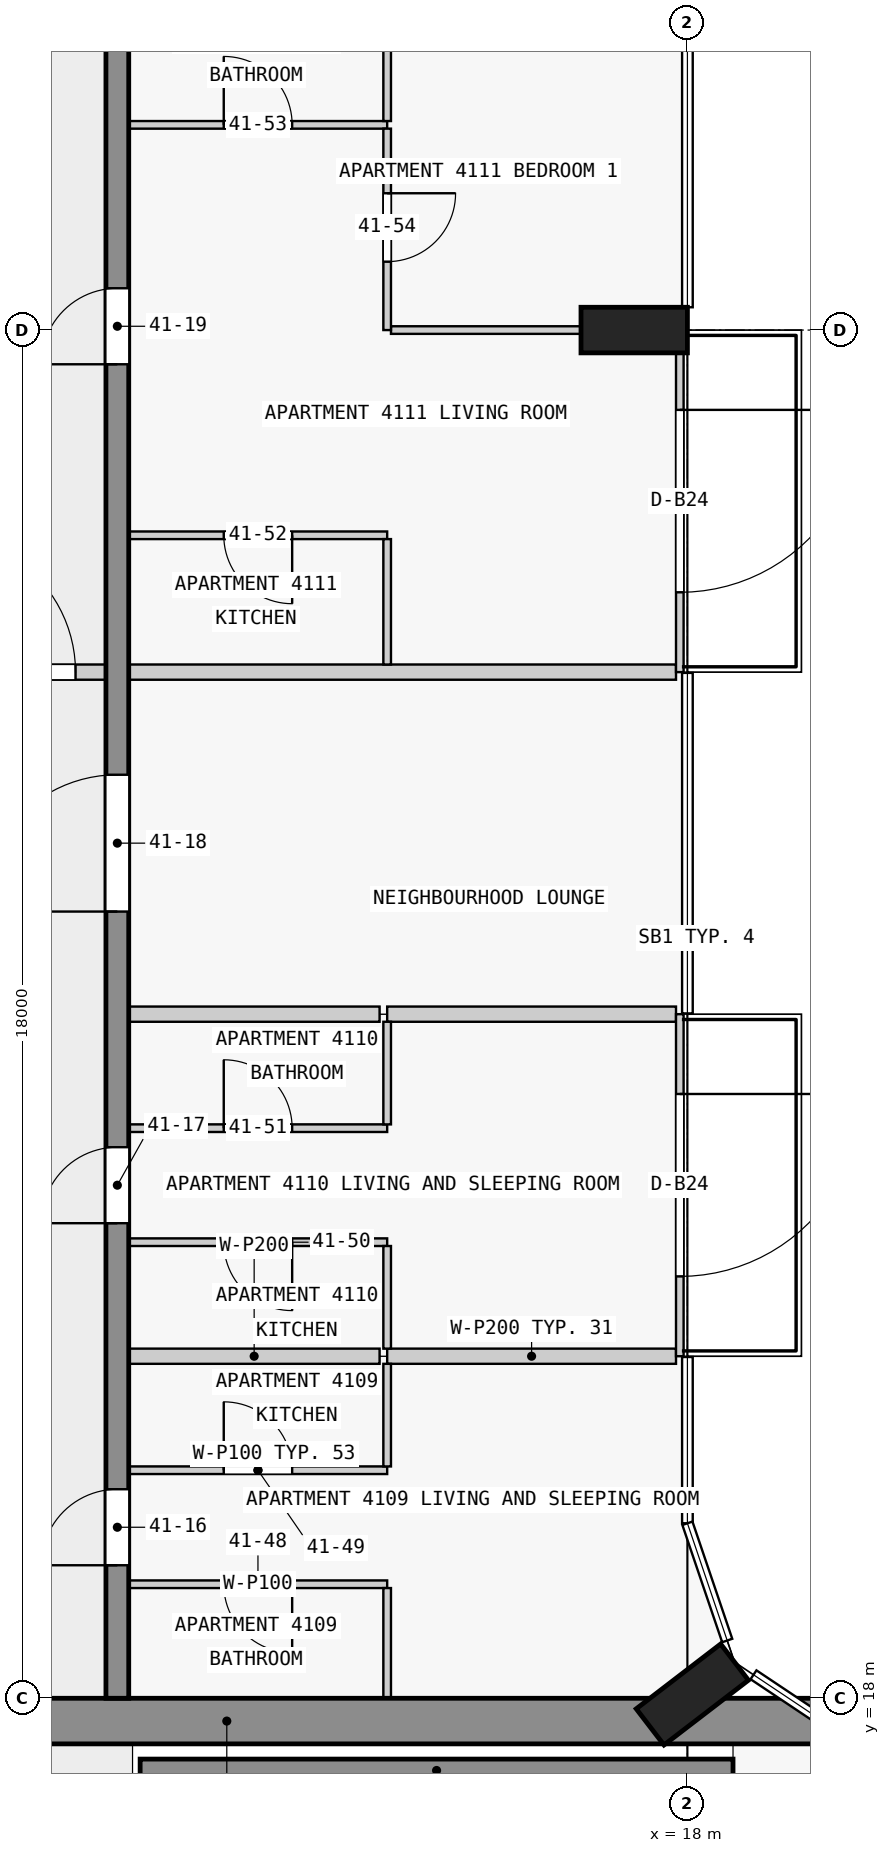
"""IFC4 building model, lengths in metres.
Left out: names, types, materials, properties, quantities, classifications, styles, units other than length and angle.
Written with IfcOpenShell. Run it as: python <this file> out.ifc"""

import sys

from ifc_helpers import new_model, si_unit, direction, frame, frame_2d, origin, origin_2d, place, context, subcontext, project, spatial, rectangle, extrude, element, fill, save


model = new_model("IFC4")
c1 = context("Model", 3, precision=1e-05, world=origin(), true_north=direction((0.0, 1.0)))
c2 = subcontext(c1, "Body", "Model", "MODEL_VIEW")
j1 = project(units=[si_unit("LENGTHUNIT", "METRE"), si_unit("PLANEANGLEUNIT", "RADIAN")], contexts=[c1])
p1 = place(None, origin())
s1 = spatial("IfcSite", under=j1, at=p1, CompositionType="ELEMENT")
p2 = place(p1, origin())
s2 = spatial("IfcBuilding", under=s1, at=p2, CompositionType="ELEMENT")
p3 = place(p2, frame((0.0, 0.0, 160.4)))
s3 = spatial("IfcBuildingStorey", under=s2, at=p3, CompositionType="ELEMENT", Elevation=160.4)
for number, where, z_axis, x_axis in (
    (1, (18.065, 18.05, 0.0), (0.0, 0.0, 1.0), (-0.609, 0.793, 0.0)),
    (2, (17.3, 36.0, 0.0), (0.0, 0.0, 1.0), (0.0, 1.0, 0.0)),
):
    element("IfcColumn", number, at=place(p3, frame(where, z_axis=z_axis, x_axis=x_axis)), inside=s3, PredefinedType="COLUMN", context=c2, shape_type="SweptSolid", body=[
        extrude(rectangle(XDim=0.6, YDim=1.4, at=origin_2d()), origin(), (0.0, 0.0, 1.0), 3.5),
    ])
p4 = place(p3, frame((1.38, 17.7, 0.0), z_axis=(0.0, 0.0, 1.0), x_axis=(1.0, 0.0, 0.0)))
e3 = element("IfcWall", 3, at=p4, inside=s3, PredefinedType="SHEAR", context=c2, shape_type="SweptSolid", body=[
    extrude(rectangle(XDim=21.12, YDim=0.6, at=frame_2d((10.56, 0.0))), origin(), (0.0, 0.0, 1.0), 3.25),
])
p5 = place(p4, frame((6.4, 0.0, 0.0)))
e4 = element("IfcOpeningElement", 4, at=p5, cuts=e3, PredefinedType="OPENING", context=c2, shape_type="SweptSolid", body=[
    extrude(rectangle(XDim=1.8, YDim=2.1, at=frame_2d((0.9, 1.05))), frame((0.0, 0.31, 0.0), z_axis=(0.0, -1.0, 0.0), x_axis=(1.0, 0.0, 0.0)), (0.0, 0.0, 1.0), 0.62),
])
p6 = place(p3, frame((10.8, 17.05, 0.0), z_axis=(0.0, 0.0, 1.0), x_axis=(1.0, 0.0, 0.0)))
e5 = element("IfcWall", 5, at=p6, inside=s3, PredefinedType="SHEAR", context=c2, shape_type="SweptSolid", body=[
    extrude(rectangle(XDim=7.8, YDim=0.3, at=frame_2d((3.9, 0.0))), origin(), (0.0, 0.0, 1.0), 3.25),
])
p7 = place(p3, frame((10.5, 18.0, 0.0), z_axis=(0.0, 0.0, 1.0), x_axis=(0.0, 1.0, 0.0)))
e6 = element("IfcWall", 6, at=p7, inside=s3, PredefinedType="SHEAR", context=c2, shape_type="SweptSolid", body=[
    extrude(rectangle(XDim=27.0, YDim=0.3, at=frame_2d((13.5, 0.0))), origin(), (0.0, 0.0, 1.0), 3.25),
])
p8 = place(p7, frame((1.75, 0.0, 0.0)))
e7 = element("IfcOpeningElement", 7, at=p8, cuts=e6, PredefinedType="OPENING", context=c2, shape_type="SweptSolid", body=[
    extrude(rectangle(XDim=1.0, YDim=2.1, at=frame_2d((0.5, 1.05))), frame((0.0, 0.16, 0.0), z_axis=(0.0, -1.0, 0.0), x_axis=(1.0, 0.0, 0.0)), (0.0, 0.0, 1.0), 0.32),
])
p9 = place(p7, frame((6.25, 0.0, 0.0)))
e8 = element("IfcOpeningElement", 8, at=p9, cuts=e6, PredefinedType="OPENING", context=c2, shape_type="SweptSolid", body=[
    extrude(rectangle(XDim=1.0, YDim=2.1, at=frame_2d((0.5, 1.05))), frame((0.0, 0.16, 0.0), z_axis=(0.0, -1.0, 0.0), x_axis=(1.0, 0.0, 0.0)), (0.0, 0.0, 1.0), 0.32),
])
p10 = place(p7, frame((10.35, 0.0, 0.0)))
e9 = element("IfcOpeningElement", 9, at=p10, cuts=e6, PredefinedType="OPENING", context=c2, shape_type="SweptSolid", body=[
    extrude(rectangle(XDim=1.8, YDim=2.1, at=frame_2d((0.9, 1.05))), frame((0.0, 0.16, 0.0), z_axis=(0.0, -1.0, 0.0), x_axis=(1.0, 0.0, 0.0)), (0.0, 0.0, 1.0), 0.32),
])
p11 = place(p7, frame((17.55, 0.0, 0.0)))
e10 = element("IfcOpeningElement", 10, at=p11, cuts=e6, PredefinedType="OPENING", context=c2, shape_type="SweptSolid", body=[
    extrude(rectangle(XDim=1.0, YDim=2.1, at=frame_2d((0.5, 1.05))), frame((0.0, 0.16, 0.0), z_axis=(0.0, -1.0, 0.0), x_axis=(1.0, 0.0, 0.0)), (0.0, 0.0, 1.0), 0.32),
])
p12 = place(p7, frame((23.25, 0.0, 0.0)))
e11 = element("IfcOpeningElement", 11, at=p12, cuts=e6, PredefinedType="OPENING", context=c2, shape_type="SweptSolid", body=[
    extrude(rectangle(XDim=0.9, YDim=2.1, at=frame_2d((0.45, 1.05))), frame((0.0, 0.16, 0.0), z_axis=(0.0, -1.0, 0.0), x_axis=(1.0, 0.0, 0.0)), (0.0, 0.0, 1.0), 0.32),
])
p13 = place(p7, frame((25.45, 0.0, 0.0)))
e12 = element("IfcOpeningElement", 12, at=p13, cuts=e6, PredefinedType="OPENING", context=c2, shape_type="SweptSolid", body=[
    extrude(rectangle(XDim=1.0, YDim=2.1, at=frame_2d((0.5, 1.05))), frame((0.0, 0.16, 0.0), z_axis=(0.0, -1.0, 0.0), x_axis=(1.0, 0.0, 0.0)), (0.0, 0.0, 1.0), 0.32),
])
p14 = place(p3, frame((17.9, 27.0, 0.0), z_axis=(0.0, 0.0, 1.0), x_axis=(0.0, -1.0, 0.0)))
e13 = element("IfcWall", 13, at=p14, inside=s3, PredefinedType="STANDARD", context=c2, shape_type="SweptSolid", body=[
    extrude(rectangle(XDim=4.5, YDim=0.1, at=frame_2d((2.25, 0.0))), origin(), (0.0, 0.0, 1.0), 3.25),
])
p15 = place(p14, frame((1.05, 0.0, 0.0)))
e14 = element("IfcOpeningElement", 14, at=p15, cuts=e13, PredefinedType="OPENING", context=c2, shape_type="SweptSolid", body=[
    extrude(rectangle(XDim=2.4, YDim=2.4, at=frame_2d((1.2, 1.2))), frame((0.0, 0.06, 0.0), z_axis=(0.0, -1.0, 0.0), x_axis=(1.0, 0.0, 0.0)), (0.0, 0.0, 1.0), 0.12),
])
p16 = place(p3, frame((17.9, 36.0, 0.0), z_axis=(0.0, 0.0, 1.0), x_axis=(0.0, -1.0, 0.0)))
e15 = element("IfcWall", 15, at=p16, inside=s3, PredefinedType="STANDARD", context=c2, shape_type="SweptSolid", body=[
    extrude(rectangle(XDim=4.5, YDim=0.1, at=frame_2d((2.25, 0.0))), origin(), (0.0, 0.0, 1.0), 3.25),
])
p17 = place(p16, frame((1.05, 0.0, 0.0)))
e16 = element("IfcOpeningElement", 16, at=p17, cuts=e15, PredefinedType="OPENING", context=c2, shape_type="SweptSolid", body=[
    extrude(rectangle(XDim=2.4, YDim=2.4, at=frame_2d((1.2, 1.2))), frame((0.0, 0.06, 0.0), z_axis=(0.0, -1.0, 0.0), x_axis=(1.0, 0.0, 0.0)), (0.0, 0.0, 1.0), 0.12),
])
p18 = place(p3, frame((14.05, 19.5, 0.0), z_axis=(0.0, 0.0, 1.0), x_axis=(-1.0, 0.0, 0.0)))
e17 = element("IfcWall", 17, at=p18, inside=s3, PredefinedType="PARTITIONING", context=c2, shape_type="SweptSolid", body=[
    extrude(rectangle(XDim=3.4, YDim=0.1, at=frame_2d((1.7, 0.0))), origin(), (0.0, 0.0, 1.0), 3.25),
])
p19 = place(p18, frame((1.25, 0.0, 0.0)))
e18 = element("IfcOpeningElement", 18, at=p19, cuts=e17, PredefinedType="OPENING", context=c2, shape_type="SweptSolid", body=[
    extrude(rectangle(XDim=0.9, YDim=2.1, at=frame_2d((0.45, 1.05))), frame((0.0, 0.06, 0.0), z_axis=(0.0, -1.0, 0.0), x_axis=(1.0, 0.0, 0.0)), (0.0, 0.0, 1.0), 0.12),
])
p20 = place(p3, frame((10.65, 21.0, 0.0), z_axis=(0.0, 0.0, 1.0), x_axis=(1.0, 0.0, 0.0)))
e19 = element("IfcWall", 19, at=p20, inside=s3, PredefinedType="PARTITIONING", context=c2, shape_type="SweptSolid", body=[
    extrude(rectangle(XDim=3.4, YDim=0.1, at=frame_2d((1.7, 0.0))), origin(), (0.0, 0.0, 1.0), 3.25),
])
p21 = place(p20, frame((1.25, 0.0, 0.0)))
e20 = element("IfcOpeningElement", 20, at=p21, cuts=e19, PredefinedType="OPENING", context=c2, shape_type="SweptSolid", body=[
    extrude(rectangle(XDim=0.9, YDim=2.1, at=frame_2d((0.45, 1.05))), frame((0.0, 0.06, 0.0), z_axis=(0.0, -1.0, 0.0), x_axis=(1.0, 0.0, 0.0)), (0.0, 0.0, 1.0), 0.12),
])
p22 = place(p3, frame((13.95, 22.5, 0.0), z_axis=(0.0, 0.0, 1.0), x_axis=(-1.0, 0.0, 0.0)))
e21 = element("IfcWall", 21, at=p22, inside=s3, PredefinedType="PARTITIONING", context=c2, shape_type="SweptSolid", body=[
    extrude(rectangle(XDim=3.3, YDim=0.2, at=frame_2d((1.65, 0.0))), origin(), (0.0, 0.0, 1.0), 3.25),
])
p23 = place(p3, frame((14.05, 22.5, 0.0), z_axis=(0.0, 0.0, 1.0), x_axis=(1.0, 0.0, 0.0)))
e22 = element("IfcWall", 22, at=p23, inside=s3, PredefinedType="PARTITIONING", context=c2, shape_type="SweptSolid", body=[
    extrude(rectangle(XDim=3.8, YDim=0.2, at=frame_2d((1.9, 0.0))), origin(), (0.0, 0.0, 1.0), 3.25),
])
p24 = place(p3, frame((14.05, 24.0, 0.0), z_axis=(0.0, 0.0, 1.0), x_axis=(-1.0, 0.0, 0.0)))
e23 = element("IfcWall", 23, at=p24, inside=s3, PredefinedType="PARTITIONING", context=c2, shape_type="SweptSolid", body=[
    extrude(rectangle(XDim=3.4, YDim=0.1, at=frame_2d((1.7, 0.0))), origin(), (0.0, 0.0, 1.0), 3.25),
])
p25 = place(p24, frame((1.25, 0.0, 0.0)))
e24 = element("IfcOpeningElement", 24, at=p25, cuts=e23, PredefinedType="OPENING", context=c2, shape_type="SweptSolid", body=[
    extrude(rectangle(XDim=0.9, YDim=2.1, at=frame_2d((0.45, 1.05))), frame((0.0, 0.06, 0.0), z_axis=(0.0, -1.0, 0.0), x_axis=(1.0, 0.0, 0.0)), (0.0, 0.0, 1.0), 0.12),
])
p26 = place(p3, frame((10.65, 25.5, 0.0), z_axis=(0.0, 0.0, 1.0), x_axis=(1.0, 0.0, 0.0)))
e25 = element("IfcWall", 25, at=p26, inside=s3, PredefinedType="PARTITIONING", context=c2, shape_type="SweptSolid", body=[
    extrude(rectangle(XDim=3.4, YDim=0.1, at=frame_2d((1.7, 0.0))), origin(), (0.0, 0.0, 1.0), 3.25),
])
p27 = place(p26, frame((1.25, 0.0, 0.0)))
e26 = element("IfcOpeningElement", 26, at=p27, cuts=e25, PredefinedType="OPENING", context=c2, shape_type="SweptSolid", body=[
    extrude(rectangle(XDim=0.9, YDim=2.1, at=frame_2d((0.45, 1.05))), frame((0.0, 0.06, 0.0), z_axis=(0.0, -1.0, 0.0), x_axis=(1.0, 0.0, 0.0)), (0.0, 0.0, 1.0), 0.12),
])
p28 = place(p3, frame((13.95, 27.0, 0.0), z_axis=(0.0, 0.0, 1.0), x_axis=(-1.0, 0.0, 0.0)))
e27 = element("IfcWall", 27, at=p28, inside=s3, PredefinedType="PARTITIONING", context=c2, shape_type="SweptSolid", body=[
    extrude(rectangle(XDim=3.3, YDim=0.2, at=frame_2d((1.65, 0.0))), origin(), (0.0, 0.0, 1.0), 3.25),
])
p29 = place(p3, frame((14.05, 27.0, 0.0), z_axis=(0.0, 0.0, 1.0), x_axis=(1.0, 0.0, 0.0)))
e28 = element("IfcWall", 28, at=p29, inside=s3, PredefinedType="PARTITIONING", context=c2, shape_type="SweptSolid", body=[
    extrude(rectangle(XDim=3.8, YDim=0.2, at=frame_2d((1.9, 0.0))), origin(), (0.0, 0.0, 1.0), 3.25),
])
p30 = place(p3, frame((17.85, 31.5, 0.0), z_axis=(0.0, 0.0, 1.0), x_axis=(-1.0, 0.0, 0.0)))
e29 = element("IfcWall", 29, at=p30, inside=s3, PredefinedType="PARTITIONING", context=c2, shape_type="SweptSolid", body=[
    extrude(rectangle(XDim=7.2, YDim=0.2, at=frame_2d((3.6, 0.0))), origin(), (0.0, 0.0, 1.0), 3.25),
])
p31 = place(p3, frame((14.05, 33.3, 0.0), z_axis=(0.0, 0.0, 1.0), x_axis=(-1.0, 0.0, 0.0)))
e30 = element("IfcWall", 30, at=p31, inside=s3, PredefinedType="PARTITIONING", context=c2, shape_type="SweptSolid", body=[
    extrude(rectangle(XDim=3.4, YDim=0.1, at=frame_2d((1.7, 0.0))), origin(), (0.0, 0.0, 1.0), 3.25),
])
p32 = place(p31, frame((1.25, 0.0, 0.0)))
e31 = element("IfcOpeningElement", 31, at=p32, cuts=e30, PredefinedType="OPENING", context=c2, shape_type="SweptSolid", body=[
    extrude(rectangle(XDim=0.9, YDim=2.1, at=frame_2d((0.45, 1.05))), frame((0.0, 0.06, 0.0), z_axis=(0.0, -1.0, 0.0), x_axis=(1.0, 0.0, 0.0)), (0.0, 0.0, 1.0), 0.12),
])
p33 = place(p3, frame((14.1, 36.0, 0.0), z_axis=(0.0, 0.0, 1.0), x_axis=(1.0, 0.0, 0.0)))
e32 = element("IfcWall", 32, at=p33, inside=s3, PredefinedType="PARTITIONING", context=c2, shape_type="SweptSolid", body=[
    extrude(rectangle(XDim=2.5, YDim=0.1, at=frame_2d((1.25, 0.0))), origin(), (0.0, 0.0, 1.0), 3.25),
])
p34 = place(p3, frame((10.65, 38.7, 0.0), z_axis=(0.0, 0.0, 1.0), x_axis=(1.0, 0.0, 0.0)))
e33 = element("IfcWall", 33, at=p34, inside=s3, PredefinedType="PARTITIONING", context=c2, shape_type="SweptSolid", body=[
    extrude(rectangle(XDim=3.4, YDim=0.1, at=frame_2d((1.7, 0.0))), origin(), (0.0, 0.0, 1.0), 3.25),
])
p35 = place(p34, frame((1.25, 0.0, 0.0)))
e34 = element("IfcOpeningElement", 34, at=p35, cuts=e33, PredefinedType="OPENING", context=c2, shape_type="SweptSolid", body=[
    extrude(rectangle(XDim=0.9, YDim=2.1, at=frame_2d((0.45, 1.05))), frame((0.0, 0.06, 0.0), z_axis=(0.0, -1.0, 0.0), x_axis=(1.0, 0.0, 0.0)), (0.0, 0.0, 1.0), 0.12),
])
p36 = place(p3, frame((14.05, 38.65, 0.0), z_axis=(0.0, 0.0, 1.0), x_axis=(0.0, -1.0, 0.0)))
e35 = element("IfcWall", 35, at=p36, inside=s3, PredefinedType="PARTITIONING", context=c2, shape_type="SweptSolid", body=[
    extrude(rectangle(XDim=2.65, YDim=0.1, at=frame_2d((1.325, 0.0))), origin(), (0.0, 0.0, 1.0), 3.25),
])
p37 = place(p36, frame((0.85, 0.0, 0.0)))
e36 = element("IfcOpeningElement", 36, at=p37, cuts=e35, PredefinedType="OPENING", context=c2, shape_type="SweptSolid", body=[
    extrude(rectangle(XDim=0.9, YDim=2.1, at=frame_2d((0.45, 1.05))), frame((0.0, 0.06, 0.0), z_axis=(0.0, -1.0, 0.0), x_axis=(1.0, 0.0, 0.0)), (0.0, 0.0, 1.0), 0.12),
])
p38 = place(p3, frame((14.05, 18.0, 0.0), z_axis=(0.0, 0.0, 1.0), x_axis=(0.0, 1.0, 0.0)))
e37 = element("IfcWall", 37, at=p38, inside=s3, PredefinedType="PARTITIONING", context=c2, shape_type="SweptSolid", body=[
    extrude(rectangle(XDim=1.45, YDim=0.1, at=frame_2d((0.725, 0.0))), origin(), (0.0, 0.0, 1.0), 3.25),
])
for number, where, z_axis, x_axis in (
    (38, (14.05, 21.05, 0.0), (0.0, 0.0, 1.0), (0.0, 1.0, 0.0)),
    (39, (14.05, 22.6, 0.0), (0.0, 0.0, 1.0), (0.0, 1.0, 0.0)),
    (40, (14.05, 25.55, 0.0), (0.0, 0.0, 1.0), (0.0, 1.0, 0.0)),
):
    element("IfcWall", number, at=place(p3, frame(where, z_axis=z_axis, x_axis=x_axis)), inside=s3, PredefinedType="PARTITIONING", context=c2, shape_type="SweptSolid", body=[
        extrude(rectangle(XDim=1.35, YDim=0.1, at=frame_2d((0.675, 0.0))), origin(), (0.0, 0.0, 1.0), 3.25),
    ])
for number, where, z_axis, x_axis in (
    (41, (14.05, 31.6, 0.0), (0.0, 0.0, 1.0), (0.0, 1.0, 0.0)),
    (42, (14.05, 38.75, 0.0), (0.0, 0.0, 1.0), (0.0, 1.0, 0.0)),
):
    element("IfcWall", number, at=place(p3, frame(where, z_axis=z_axis, x_axis=x_axis)), inside=s3, PredefinedType="PARTITIONING", context=c2, shape_type="SweptSolid", body=[
        extrude(rectangle(XDim=1.65, YDim=0.1, at=frame_2d((0.825, 0.0))), origin(), (0.0, 0.0, 1.0), 3.25),
    ])
p39 = place(p3, frame((7.45, 31.5, 0.0), z_axis=(0.0, 0.0, 1.0), x_axis=(1.0, 0.0, 0.0)))
e43 = element("IfcWall", 43, at=p39, inside=s3, PredefinedType="PARTITIONING", context=c2, shape_type="SweptSolid", body=[
    extrude(rectangle(XDim=3.1, YDim=0.2, at=frame_2d((1.55, 0.0))), origin(), (0.0, 0.0, 1.0), 3.25),
])
p40 = place(p39, frame((0.7, 0.0, 0.0)))
e44 = element("IfcOpeningElement", 44, at=p40, cuts=e43, PredefinedType="OPENING", context=c2, shape_type="SweptSolid", body=[
    extrude(rectangle(XDim=1.8, YDim=2.1, at=frame_2d((0.9, 1.05))), frame((0.0, 0.11, 0.0), z_axis=(0.0, -1.0, 0.0), x_axis=(1.0, 0.0, 0.0)), (0.0, 0.0, 1.0), 0.22),
])
p41 = place(p15, origin())
e45 = element("IfcDoor", 45, at=p41, inside=s3, OperationType="SINGLE_SWING_LEFT", PredefinedType="DOOR", context=c2, shape_type="SweptSolid", body=[
    extrude(rectangle(XDim=2.4, YDim=2.4, at=frame_2d((1.2, 1.2))), frame((0.0, 0.025, 0.0), z_axis=(0.0, -1.0, 0.0), x_axis=(1.0, 0.0, 0.0)), (0.0, 0.0, 1.0), 0.05),
])
fill(e14, e45)
p42 = place(p17, origin())
e46 = element("IfcDoor", 46, at=p42, inside=s3, OperationType="SINGLE_SWING_LEFT", PredefinedType="DOOR", context=c2, shape_type="SweptSolid", body=[
    extrude(rectangle(XDim=2.4, YDim=2.4, at=frame_2d((1.2, 1.2))), frame((0.0, 0.025, 0.0), z_axis=(0.0, -1.0, 0.0), x_axis=(1.0, 0.0, 0.0)), (0.0, 0.0, 1.0), 0.05),
])
fill(e16, e46)
p43 = place(p8, origin())
e47 = element("IfcDoor", 47, at=p43, inside=s3, OperationType="SINGLE_SWING_LEFT", PredefinedType="DOOR", context=c2, shape_type="SweptSolid", body=[
    extrude(rectangle(XDim=1.0, YDim=2.1, at=frame_2d((0.5, 1.05))), frame((0.0, 0.025, 0.0), z_axis=(0.0, -1.0, 0.0), x_axis=(1.0, 0.0, 0.0)), (0.0, 0.0, 1.0), 0.05),
])
fill(e7, e47)
p44 = place(p9, origin())
e48 = element("IfcDoor", 48, at=p44, inside=s3, OperationType="SINGLE_SWING_LEFT", PredefinedType="DOOR", context=c2, shape_type="SweptSolid", body=[
    extrude(rectangle(XDim=1.0, YDim=2.1, at=frame_2d((0.5, 1.05))), frame((0.0, 0.025, 0.0), z_axis=(0.0, -1.0, 0.0), x_axis=(1.0, 0.0, 0.0)), (0.0, 0.0, 1.0), 0.05),
])
fill(e8, e48)
p45 = place(p10, origin())
e49 = element("IfcDoor", 49, at=p45, inside=s3, OperationType="SINGLE_SWING_LEFT", PredefinedType="DOOR", context=c2, shape_type="SweptSolid", body=[
    extrude(rectangle(XDim=1.8, YDim=2.1, at=frame_2d((0.9, 1.05))), frame((0.0, 0.025, 0.0), z_axis=(0.0, -1.0, 0.0), x_axis=(1.0, 0.0, 0.0)), (0.0, 0.0, 1.0), 0.05),
])
fill(e9, e49)
p46 = place(p11, origin())
e50 = element("IfcDoor", 50, at=p46, inside=s3, OperationType="SINGLE_SWING_RIGHT", PredefinedType="DOOR", context=c2, shape_type="SweptSolid", body=[
    extrude(rectangle(XDim=1.0, YDim=2.1, at=frame_2d((0.5, 1.05))), frame((0.0, 0.025, 0.0), z_axis=(0.0, -1.0, 0.0), x_axis=(1.0, 0.0, 0.0)), (0.0, 0.0, 1.0), 0.05),
])
fill(e10, e50)
p47 = place(p40, origin())
e51 = element("IfcDoor", 51, at=p47, inside=s3, OperationType="SINGLE_SWING_RIGHT", PredefinedType="DOOR", context=c2, shape_type="SweptSolid", body=[
    extrude(rectangle(XDim=1.8, YDim=2.1, at=frame_2d((0.9, 1.05))), frame((0.0, 0.025, 0.0), z_axis=(0.0, -1.0, 0.0), x_axis=(1.0, 0.0, 0.0)), (0.0, 0.0, 1.0), 0.05),
])
fill(e44, e51)
p48 = place(p19, origin())
e52 = element("IfcDoor", 52, at=p48, inside=s3, OperationType="SINGLE_SWING_LEFT", PredefinedType="DOOR", context=c2, shape_type="SweptSolid", body=[
    extrude(rectangle(XDim=0.9, YDim=2.1, at=frame_2d((0.45, 1.05))), frame((0.0, 0.025, 0.0), z_axis=(0.0, -1.0, 0.0), x_axis=(1.0, 0.0, 0.0)), (0.0, 0.0, 1.0), 0.05),
])
fill(e18, e52)
p49 = place(p21, origin())
e53 = element("IfcDoor", 53, at=p49, inside=s3, OperationType="SINGLE_SWING_LEFT", PredefinedType="DOOR", context=c2, shape_type="SweptSolid", body=[
    extrude(rectangle(XDim=0.9, YDim=2.1, at=frame_2d((0.45, 1.05))), frame((0.0, 0.025, 0.0), z_axis=(0.0, -1.0, 0.0), x_axis=(1.0, 0.0, 0.0)), (0.0, 0.0, 1.0), 0.05),
])
fill(e20, e53)
p50 = place(p25, origin())
e54 = element("IfcDoor", 54, at=p50, inside=s3, OperationType="SINGLE_SWING_LEFT", PredefinedType="DOOR", context=c2, shape_type="SweptSolid", body=[
    extrude(rectangle(XDim=0.9, YDim=2.1, at=frame_2d((0.45, 1.05))), frame((0.0, 0.025, 0.0), z_axis=(0.0, -1.0, 0.0), x_axis=(1.0, 0.0, 0.0)), (0.0, 0.0, 1.0), 0.05),
])
fill(e24, e54)
p51 = place(p27, origin())
e55 = element("IfcDoor", 55, at=p51, inside=s3, OperationType="SINGLE_SWING_LEFT", PredefinedType="DOOR", context=c2, shape_type="SweptSolid", body=[
    extrude(rectangle(XDim=0.9, YDim=2.1, at=frame_2d((0.45, 1.05))), frame((0.0, 0.025, 0.0), z_axis=(0.0, -1.0, 0.0), x_axis=(1.0, 0.0, 0.0)), (0.0, 0.0, 1.0), 0.05),
])
fill(e26, e55)
p52 = place(p32, origin())
e56 = element("IfcDoor", 56, at=p52, inside=s3, OperationType="SINGLE_SWING_LEFT", PredefinedType="DOOR", context=c2, shape_type="SweptSolid", body=[
    extrude(rectangle(XDim=0.9, YDim=2.1, at=frame_2d((0.45, 1.05))), frame((0.0, 0.025, 0.0), z_axis=(0.0, -1.0, 0.0), x_axis=(1.0, 0.0, 0.0)), (0.0, 0.0, 1.0), 0.05),
])
fill(e31, e56)
p53 = place(p35, origin())
e57 = element("IfcDoor", 57, at=p53, inside=s3, OperationType="SINGLE_SWING_LEFT", PredefinedType="DOOR", context=c2, shape_type="SweptSolid", body=[
    extrude(rectangle(XDim=0.9, YDim=2.1, at=frame_2d((0.45, 1.05))), frame((0.0, 0.025, 0.0), z_axis=(0.0, -1.0, 0.0), x_axis=(1.0, 0.0, 0.0)), (0.0, 0.0, 1.0), 0.05),
])
fill(e34, e57)
p54 = place(p37, origin())
e58 = element("IfcDoor", 58, at=p54, inside=s3, OperationType="SINGLE_SWING_LEFT", PredefinedType="DOOR", context=c2, shape_type="SweptSolid", body=[
    extrude(rectangle(XDim=0.9, YDim=2.1, at=frame_2d((0.45, 1.05))), frame((0.0, 0.025, 0.0), z_axis=(0.0, -1.0, 0.0), x_axis=(1.0, 0.0, 0.0)), (0.0, 0.0, 1.0), 0.05),
])
fill(e36, e58)
save(model, sys.argv[1])
